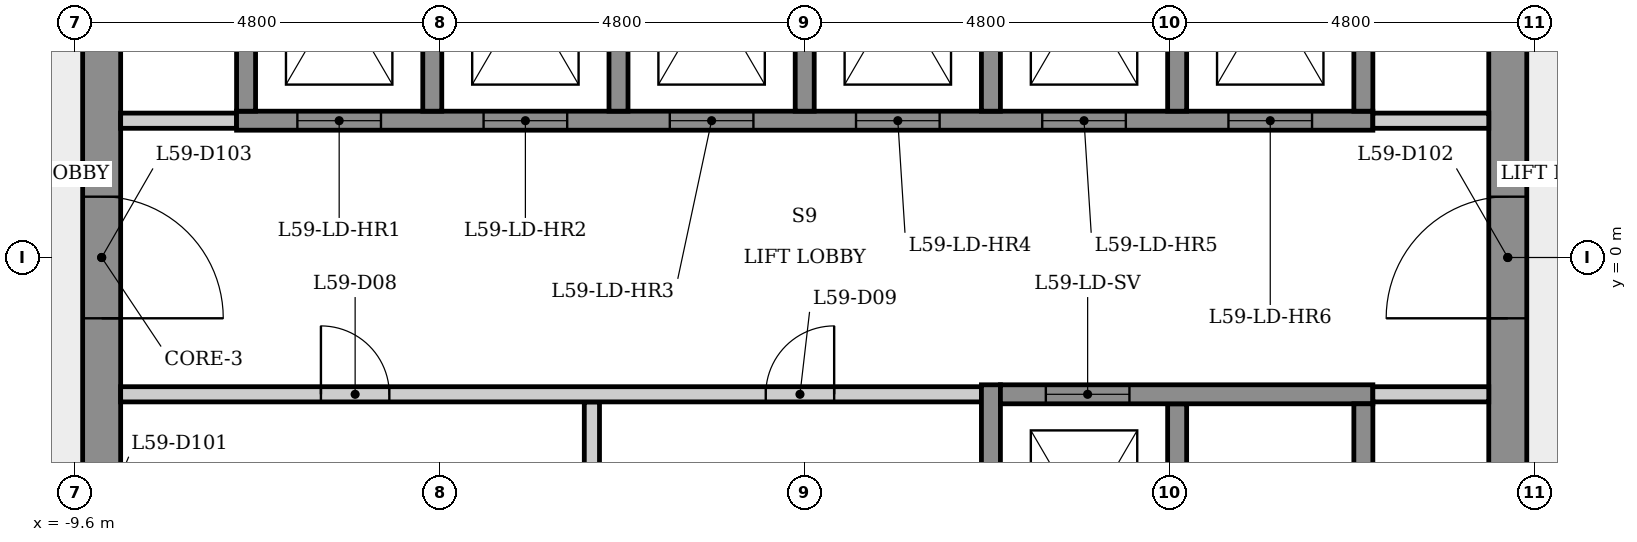
"""IFC4 building model, lengths in metres.
Left out: names, types, materials, properties, quantities, classifications, styles, units other than length and angle.
Written with IfcOpenShell. Run it as: python <this file> out.ifc"""

import sys

from ifc_helpers import new_model, si_unit, direction, frame, frame_2d, origin, place, context, subcontext, project, spatial, rectangle, extrude, element, fill, save


model = new_model("IFC4")
c1 = context("Model", 3, precision=1e-05, world=origin(), true_north=direction((0.0, 1.0)))
c2 = subcontext(c1, "Body", "Model", "MODEL_VIEW")
j1 = project(units=[si_unit("LENGTHUNIT", "METRE"), si_unit("PLANEANGLEUNIT", "RADIAN")], contexts=[c1])
p1 = place(None, origin())
s1 = spatial("IfcSite", under=j1, at=p1, CompositionType="ELEMENT")
p2 = place(p1, origin())
s2 = spatial("IfcBuilding", under=s1, at=p2, CompositionType="ELEMENT")
p3 = place(p2, frame((0.0, 0.0, 222.3)))
s3 = spatial("IfcBuildingStorey", under=s2, at=p3, CompositionType="ELEMENT", Elevation=222.3)
p4 = place(p3, frame((9.25, -5.485, 0.0), z_axis=(0.0, 0.0, 1.0), x_axis=(0.0, 1.0, 0.0)))
e1 = element("IfcWall", 1, at=p4, inside=s3, PredefinedType="SHEAR", context=c2, shape_type="SweptSolid", body=[
    extrude(rectangle(XDim=10.97, YDim=0.5, at=frame_2d((5.485, 0.0))), origin(), (0.0, 0.0, 1.0), 3.4),
])
p5 = place(p4, frame((4.685, 0.0, 0.0)))
e2 = element("IfcOpeningElement", 2, at=p5, cuts=e1, PredefinedType="OPENING", context=c2, shape_type="SweptSolid", body=[
    extrude(rectangle(XDim=1.6, YDim=2.1, at=frame_2d((0.8, 1.05))), frame((0.0, 0.26, 0.0), z_axis=(0.0, -1.0, 0.0), x_axis=(1.0, 0.0, 0.0)), (0.0, 0.0, 1.0), 0.52),
])
p6 = place(p3, frame((-9.25, 5.485, 0.0), z_axis=(0.0, 0.0, 1.0), x_axis=(0.0, -1.0, 0.0)))
e3 = element("IfcWall", 3, at=p6, inside=s3, PredefinedType="SHEAR", context=c2, shape_type="SweptSolid", body=[
    extrude(rectangle(XDim=10.97, YDim=0.5, at=frame_2d((5.485, 0.0))), origin(), (0.0, 0.0, 1.0), 3.4),
])
p7 = place(p6, frame((8.51, 0.0, 0.0)))
e4 = element("IfcOpeningElement", 4, at=p7, cuts=e3, PredefinedType="OPENING", context=c2, shape_type="SweptSolid", body=[
    extrude(rectangle(XDim=0.9, YDim=2.1, at=frame_2d((0.45, 1.05))), frame((0.0, 0.26, 0.0), z_axis=(0.0, -1.0, 0.0), x_axis=(1.0, 0.0, 0.0)), (0.0, 0.0, 1.0), 0.52),
])
p8 = place(p6, frame((4.685, 0.0, 0.0)))
e5 = element("IfcOpeningElement", 5, at=p8, cuts=e3, PredefinedType="OPENING", context=c2, shape_type="SweptSolid", body=[
    extrude(rectangle(XDim=1.6, YDim=2.1, at=frame_2d((0.8, 1.05))), frame((0.0, 0.26, 0.0), z_axis=(0.0, -1.0, 0.0), x_axis=(1.0, 0.0, 0.0)), (0.0, 0.0, 1.0), 0.52),
])
p9 = place(p3, frame((-9.0, 1.8, 0.0), z_axis=(0.0, 0.0, 1.0), x_axis=(1.0, 0.0, 0.0)))
e6 = element("IfcWall", 6, at=p9, inside=s3, PredefinedType="PARTITIONING", context=c2, shape_type="SweptSolid", body=[
    extrude(rectangle(XDim=1.525, YDim=0.2, at=frame_2d((0.763, 0.0))), origin(), (0.0, 0.0, 1.0), 3.05),
])
p10 = place(p3, frame((-7.475, 1.8, 0.0), z_axis=(0.0, 0.0, 1.0), x_axis=(1.0, 0.0, 0.0)))
e7 = element("IfcWall", 7, at=p10, inside=s3, PredefinedType="SHEAR", context=c2, shape_type="SweptSolid", body=[
    extrude(rectangle(XDim=14.95, YDim=0.25, at=frame_2d((7.475, 0.0))), origin(), (0.0, 0.0, 1.0), 3.05),
])
p11 = place(p10, frame((0.8, 0.0, 0.0)))
e8 = element("IfcOpeningElement", 8, at=p11, cuts=e7, PredefinedType="OPENING", context=c2, shape_type="SweptSolid", body=[
    extrude(rectangle(XDim=1.1, YDim=2.1, at=frame_2d((0.55, 1.05))), frame((0.0, 0.135, 0.0), z_axis=(0.0, -1.0, 0.0), x_axis=(1.0, 0.0, 0.0)), (0.0, 0.0, 1.0), 0.27),
])
p12 = place(p10, frame((3.25, 0.0, 0.0)))
e9 = element("IfcOpeningElement", 9, at=p12, cuts=e7, PredefinedType="OPENING", context=c2, shape_type="SweptSolid", body=[
    extrude(rectangle(XDim=1.1, YDim=2.1, at=frame_2d((0.55, 1.05))), frame((0.0, 0.135, 0.0), z_axis=(0.0, -1.0, 0.0), x_axis=(1.0, 0.0, 0.0)), (0.0, 0.0, 1.0), 0.27),
])
p13 = place(p10, frame((5.7, 0.0, 0.0)))
e10 = element("IfcOpeningElement", 10, at=p13, cuts=e7, PredefinedType="OPENING", context=c2, shape_type="SweptSolid", body=[
    extrude(rectangle(XDim=1.1, YDim=2.1, at=frame_2d((0.55, 1.05))), frame((0.0, 0.135, 0.0), z_axis=(0.0, -1.0, 0.0), x_axis=(1.0, 0.0, 0.0)), (0.0, 0.0, 1.0), 0.27),
])
p14 = place(p10, frame((8.15, 0.0, 0.0)))
e11 = element("IfcOpeningElement", 11, at=p14, cuts=e7, PredefinedType="OPENING", context=c2, shape_type="SweptSolid", body=[
    extrude(rectangle(XDim=1.1, YDim=2.1, at=frame_2d((0.55, 1.05))), frame((0.0, 0.135, 0.0), z_axis=(0.0, -1.0, 0.0), x_axis=(1.0, 0.0, 0.0)), (0.0, 0.0, 1.0), 0.27),
])
p15 = place(p10, frame((10.6, 0.0, 0.0)))
e12 = element("IfcOpeningElement", 12, at=p15, cuts=e7, PredefinedType="OPENING", context=c2, shape_type="SweptSolid", body=[
    extrude(rectangle(XDim=1.1, YDim=2.1, at=frame_2d((0.55, 1.05))), frame((0.0, 0.135, 0.0), z_axis=(0.0, -1.0, 0.0), x_axis=(1.0, 0.0, 0.0)), (0.0, 0.0, 1.0), 0.27),
])
p16 = place(p10, frame((13.05, 0.0, 0.0)))
e13 = element("IfcOpeningElement", 13, at=p16, cuts=e7, PredefinedType="OPENING", context=c2, shape_type="SweptSolid", body=[
    extrude(rectangle(XDim=1.1, YDim=2.1, at=frame_2d((0.55, 1.05))), frame((0.0, 0.135, 0.0), z_axis=(0.0, -1.0, 0.0), x_axis=(1.0, 0.0, 0.0)), (0.0, 0.0, 1.0), 0.27),
])
p17 = place(p3, frame((-7.35, 1.925, 0.0), z_axis=(0.0, 0.0, 1.0), x_axis=(0.0, 1.0, 0.0)))
e14 = element("IfcWall", 14, at=p17, inside=s3, PredefinedType="SHEAR", context=c2, shape_type="SweptSolid", body=[
    extrude(rectangle(XDim=3.35, YDim=0.25, at=frame_2d((1.675, 0.0))), origin(), (0.0, 0.0, 1.0), 3.05),
])
p18 = place(p3, frame((-4.9, 5.025, 0.0), z_axis=(0.0, 0.0, 1.0), x_axis=(0.0, -1.0, 0.0)))
e15 = element("IfcWall", 15, at=p18, inside=s3, PredefinedType="SHEAR", context=c2, shape_type="SweptSolid", body=[
    extrude(rectangle(XDim=3.1, YDim=0.25, at=frame_2d((1.55, 0.0))), origin(), (0.0, 0.0, 1.0), 3.4),
])
p19 = place(p3, frame((-2.8, -1.9, 0.0), z_axis=(0.0, 0.0, 1.0), x_axis=(0.0, -1.0, 0.0)))
e16 = element("IfcWall", 16, at=p19, inside=s3, PredefinedType="PARTITIONING", context=c2, shape_type="SweptSolid", body=[
    extrude(rectangle(XDim=3.15, YDim=0.2, at=frame_2d((1.575, 0.0))), origin(), (0.0, 0.0, 1.0), 3.05),
])
p20 = place(p3, frame((-9.0, -1.8, 0.0), z_axis=(0.0, 0.0, 1.0), x_axis=(1.0, 0.0, 0.0)))
e17 = element("IfcWall", 17, at=p20, inside=s3, PredefinedType="PARTITIONING", context=c2, shape_type="SweptSolid", body=[
    extrude(rectangle(XDim=11.325, YDim=0.2, at=frame_2d((5.663, 0.0))), origin(), (0.0, 0.0, 1.0), 3.05),
])
p21 = place(p20, frame((2.635, 0.0, 0.0)))
e18 = element("IfcOpeningElement", 18, at=p21, cuts=e17, PredefinedType="OPENING", context=c2, shape_type="SweptSolid", body=[
    extrude(rectangle(XDim=0.9, YDim=2.1, at=frame_2d((0.45, 1.05))), frame((0.0, 0.11, 0.0), z_axis=(0.0, -1.0, 0.0), x_axis=(1.0, 0.0, 0.0)), (0.0, 0.0, 1.0), 0.22),
])
p22 = place(p20, frame((8.488, 0.0, 0.0)))
e19 = element("IfcOpeningElement", 19, at=p22, cuts=e17, PredefinedType="OPENING", context=c2, shape_type="SweptSolid", body=[
    extrude(rectangle(XDim=0.9, YDim=2.1, at=frame_2d((0.45, 1.05))), frame((0.0, 0.11, 0.0), z_axis=(0.0, -1.0, 0.0), x_axis=(1.0, 0.0, 0.0)), (0.0, 0.0, 1.0), 0.22),
])
for number, where, z_axis, x_axis in (
    (20, (-2.45, 5.025, 0.0), (0.0, 0.0, 1.0), (0.0, -1.0, 0.0)),
    (21, (0.0, 5.025, 0.0), (0.0, 0.0, 1.0), (0.0, -1.0, 0.0)),
):
    element("IfcWall", number, at=place(p3, frame(where, z_axis=z_axis, x_axis=x_axis)), inside=s3, PredefinedType="SHEAR", context=c2, shape_type="SweptSolid", body=[
        extrude(rectangle(XDim=3.1, YDim=0.25, at=frame_2d((1.55, 0.0))), origin(), (0.0, 0.0, 1.0), 3.4),
    ])
p23 = place(p3, frame((2.45, -5.275, 0.0), z_axis=(0.0, 0.0, 1.0), x_axis=(0.0, 1.0, 0.0)))
e22 = element("IfcWall", 22, at=p23, inside=s3, PredefinedType="SHEAR", context=c2, shape_type="SweptSolid", body=[
    extrude(rectangle(XDim=3.6, YDim=0.25, at=frame_2d((1.8, 0.0))), origin(), (0.0, 0.0, 1.0), 3.05),
])
for number, where, z_axis, x_axis in (
    (23, (2.45, 5.025, 0.0), (0.0, 0.0, 1.0), (0.0, -1.0, 0.0)),
    (24, (4.9, -1.925, 0.0), (0.0, 0.0, 1.0), (0.0, -1.0, 0.0)),
    (25, (4.9, 5.025, 0.0), (0.0, 0.0, 1.0), (0.0, -1.0, 0.0)),
):
    element("IfcWall", number, at=place(p3, frame(where, z_axis=z_axis, x_axis=x_axis)), inside=s3, PredefinedType="SHEAR", context=c2, shape_type="SweptSolid", body=[
        extrude(rectangle(XDim=3.1, YDim=0.25, at=frame_2d((1.55, 0.0))), origin(), (0.0, 0.0, 1.0), 3.4),
    ])
p24 = place(p3, frame((2.575, -1.8, 0.0), z_axis=(0.0, 0.0, 1.0), x_axis=(1.0, 0.0, 0.0)))
e26 = element("IfcWall", 26, at=p24, inside=s3, PredefinedType="SHEAR", context=c2, shape_type="SweptSolid", body=[
    extrude(rectangle(XDim=4.9, YDim=0.25, at=frame_2d((2.45, 0.0))), origin(), (0.0, 0.0, 1.0), 3.05),
])
p25 = place(p24, frame((0.597, 0.0, 0.0)))
e27 = element("IfcOpeningElement", 27, at=p25, cuts=e26, PredefinedType="OPENING", context=c2, shape_type="SweptSolid", body=[
    extrude(rectangle(XDim=1.1, YDim=2.1, at=frame_2d((0.55, 1.05))), frame((0.0, 0.135, 0.0), z_axis=(0.0, -1.0, 0.0), x_axis=(1.0, 0.0, 0.0)), (0.0, 0.0, 1.0), 0.27),
])
p26 = place(p3, frame((7.475, 1.8, 0.0), z_axis=(0.0, 0.0, 1.0), x_axis=(1.0, 0.0, 0.0)))
e28 = element("IfcWall", 28, at=p26, inside=s3, PredefinedType="PARTITIONING", context=c2, shape_type="SweptSolid", body=[
    extrude(rectangle(XDim=1.525, YDim=0.2, at=frame_2d((0.763, 0.0))), origin(), (0.0, 0.0, 1.0), 3.05),
])
for number, where, z_axis, x_axis in (
    (29, (7.35, -1.925, 0.0), (0.0, 0.0, 1.0), (0.0, -1.0, 0.0)),
    (30, (7.35, 5.025, 0.0), (0.0, 0.0, 1.0), (0.0, -1.0, 0.0)),
):
    element("IfcWall", number, at=place(p3, frame(where, z_axis=z_axis, x_axis=x_axis)), inside=s3, PredefinedType="SHEAR", context=c2, shape_type="SweptSolid", body=[
        extrude(rectangle(XDim=3.1, YDim=0.25, at=frame_2d((1.55, 0.0))), origin(), (0.0, 0.0, 1.0), 3.4),
    ])
p27 = place(p3, frame((9.0, -1.8, 0.0), z_axis=(0.0, 0.0, 1.0), x_axis=(-1.0, 0.0, 0.0)))
e31 = element("IfcWall", 31, at=p27, inside=s3, PredefinedType="PARTITIONING", context=c2, shape_type="SweptSolid", body=[
    extrude(rectangle(XDim=1.525, YDim=0.2, at=frame_2d((0.763, 0.0))), origin(), (0.0, 0.0, 1.0), 3.05),
])
p28 = place(p11, origin())
e32 = element("IfcDoor", 32, at=p28, inside=s3, OperationType="SLIDING_TO_LEFT", PredefinedType="DOOR", context=c2, shape_type="SweptSolid", body=[
    extrude(rectangle(XDim=1.1, YDim=2.1, at=frame_2d((0.55, 1.05))), frame((0.0, 0.025, 0.0), z_axis=(0.0, -1.0, 0.0), x_axis=(1.0, 0.0, 0.0)), (0.0, 0.0, 1.0), 0.05),
])
fill(e8, e32)
p29 = place(p12, origin())
e33 = element("IfcDoor", 33, at=p29, inside=s3, OperationType="SLIDING_TO_LEFT", PredefinedType="DOOR", context=c2, shape_type="SweptSolid", body=[
    extrude(rectangle(XDim=1.1, YDim=2.1, at=frame_2d((0.55, 1.05))), frame((0.0, 0.025, 0.0), z_axis=(0.0, -1.0, 0.0), x_axis=(1.0, 0.0, 0.0)), (0.0, 0.0, 1.0), 0.05),
])
fill(e9, e33)
p30 = place(p13, origin())
e34 = element("IfcDoor", 34, at=p30, inside=s3, OperationType="SLIDING_TO_LEFT", PredefinedType="DOOR", context=c2, shape_type="SweptSolid", body=[
    extrude(rectangle(XDim=1.1, YDim=2.1, at=frame_2d((0.55, 1.05))), frame((0.0, 0.025, 0.0), z_axis=(0.0, -1.0, 0.0), x_axis=(1.0, 0.0, 0.0)), (0.0, 0.0, 1.0), 0.05),
])
fill(e10, e34)
p31 = place(p14, origin())
e35 = element("IfcDoor", 35, at=p31, inside=s3, OperationType="SLIDING_TO_LEFT", PredefinedType="DOOR", context=c2, shape_type="SweptSolid", body=[
    extrude(rectangle(XDim=1.1, YDim=2.1, at=frame_2d((0.55, 1.05))), frame((0.0, 0.025, 0.0), z_axis=(0.0, -1.0, 0.0), x_axis=(1.0, 0.0, 0.0)), (0.0, 0.0, 1.0), 0.05),
])
fill(e11, e35)
p32 = place(p15, origin())
e36 = element("IfcDoor", 36, at=p32, inside=s3, OperationType="SLIDING_TO_LEFT", PredefinedType="DOOR", context=c2, shape_type="SweptSolid", body=[
    extrude(rectangle(XDim=1.1, YDim=2.1, at=frame_2d((0.55, 1.05))), frame((0.0, 0.025, 0.0), z_axis=(0.0, -1.0, 0.0), x_axis=(1.0, 0.0, 0.0)), (0.0, 0.0, 1.0), 0.05),
])
fill(e12, e36)
p33 = place(p16, origin())
e37 = element("IfcDoor", 37, at=p33, inside=s3, OperationType="SLIDING_TO_LEFT", PredefinedType="DOOR", context=c2, shape_type="SweptSolid", body=[
    extrude(rectangle(XDim=1.1, YDim=2.1, at=frame_2d((0.55, 1.05))), frame((0.0, 0.025, 0.0), z_axis=(0.0, -1.0, 0.0), x_axis=(1.0, 0.0, 0.0)), (0.0, 0.0, 1.0), 0.05),
])
fill(e13, e37)
p34 = place(p25, origin())
e38 = element("IfcDoor", 38, at=p34, inside=s3, OperationType="SLIDING_TO_LEFT", PredefinedType="DOOR", context=c2, shape_type="SweptSolid", body=[
    extrude(rectangle(XDim=1.1, YDim=2.1, at=frame_2d((0.55, 1.05))), frame((0.0, 0.025, 0.0), z_axis=(0.0, -1.0, 0.0), x_axis=(1.0, 0.0, 0.0)), (0.0, 0.0, 1.0), 0.05),
])
fill(e27, e38)
p35 = place(p21, origin())
e39 = element("IfcDoor", 39, at=p35, inside=s3, OperationType="SINGLE_SWING_LEFT", PredefinedType="DOOR", context=c2, shape_type="SweptSolid", body=[
    extrude(rectangle(XDim=0.9, YDim=2.1, at=frame_2d((0.45, 1.05))), frame((0.0, 0.025, 0.0), z_axis=(0.0, -1.0, 0.0), x_axis=(1.0, 0.0, 0.0)), (0.0, 0.0, 1.0), 0.05),
])
fill(e18, e39)
p36 = place(p22, origin())
e40 = element("IfcDoor", 40, at=p36, inside=s3, OperationType="SINGLE_SWING_RIGHT", PredefinedType="DOOR", context=c2, shape_type="SweptSolid", body=[
    extrude(rectangle(XDim=0.9, YDim=2.1, at=frame_2d((0.45, 1.05))), frame((0.0, 0.025, 0.0), z_axis=(0.0, -1.0, 0.0), x_axis=(1.0, 0.0, 0.0)), (0.0, 0.0, 1.0), 0.05),
])
fill(e19, e40)
p37 = place(p5, origin())
e41 = element("IfcDoor", 41, at=p37, inside=s3, OperationType="SINGLE_SWING_LEFT", PredefinedType="DOOR", context=c2, shape_type="SweptSolid", body=[
    extrude(rectangle(XDim=1.6, YDim=2.1, at=frame_2d((0.8, 1.05))), frame((0.0, 0.025, 0.0), z_axis=(0.0, -1.0, 0.0), x_axis=(1.0, 0.0, 0.0)), (0.0, 0.0, 1.0), 0.05),
])
fill(e2, e41)
p38 = place(p8, origin())
e42 = element("IfcDoor", 42, at=p38, inside=s3, OperationType="SINGLE_SWING_RIGHT", PredefinedType="DOOR", context=c2, shape_type="SweptSolid", body=[
    extrude(rectangle(XDim=1.6, YDim=2.1, at=frame_2d((0.8, 1.05))), frame((0.0, 0.025, 0.0), z_axis=(0.0, -1.0, 0.0), x_axis=(1.0, 0.0, 0.0)), (0.0, 0.0, 1.0), 0.05),
])
fill(e5, e42)
save(model, sys.argv[1])
